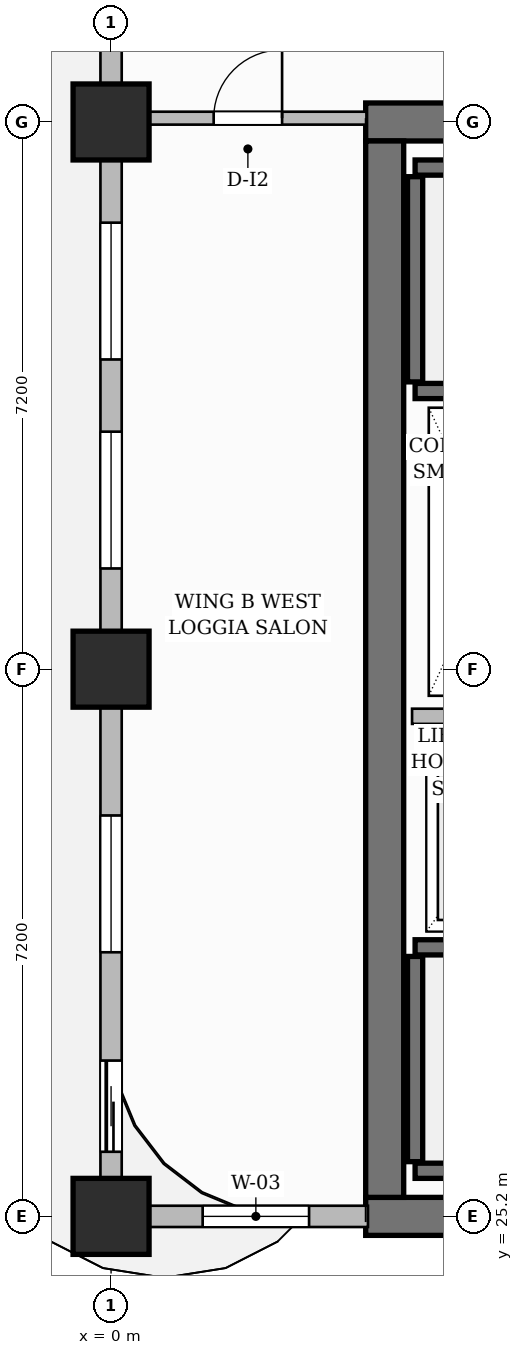
"""IFC4 building model, lengths in metres.
Left out: names, types, materials, properties, quantities, classifications, styles, units other than length and angle.
Written with IfcOpenShell. Run it as: python <this file> out.ifc"""

import sys

from ifc_helpers import new_model, si_unit, direction, frame, frame_2d, origin, origin_2d, place, context, subcontext, project, spatial, rectangle, extrude, source, transform, mapped, element, fill, save


model = new_model("IFC4")
c1 = context("Model", 3, precision=1e-05, world=origin(), true_north=direction((0.0, 1.0)))
c2 = subcontext(c1, "Body", "Model", "MODEL_VIEW")
j1 = project(units=[si_unit("LENGTHUNIT", "METRE"), si_unit("PLANEANGLEUNIT", "RADIAN")], contexts=[c1])
p1 = place(None, origin())
s1 = spatial("IfcSite", under=j1, at=p1, CompositionType="ELEMENT")
p2 = place(p1, origin())
s2 = spatial("IfcBuilding", under=s1, at=p2, CompositionType="ELEMENT")
p3 = place(p2, frame((0.0, 0.0, 165.7)))
s3 = spatial("IfcBuildingStorey", under=s2, at=p3, CompositionType="ELEMENT", Elevation=165.7)
for number, where, z_axis, x_axis in (
    (1, (3.35, 25.2, 0.0), (0.0, 0.0, 1.0), (1.0, 0.0, 0.0)),
    (2, (3.35, 39.6, 0.0), (0.0, 0.0, 1.0), (1.0, 0.0, 0.0)),
):
    element("IfcWall", number, at=place(p3, frame(where, z_axis=z_axis, x_axis=x_axis)), inside=s3, PredefinedType="SHEAR", context=c2, shape_type="SweptSolid", body=[
        extrude(rectangle(XDim=8.3, YDim=0.5, at=frame_2d((4.15, 0.0))), origin(), (0.0, 0.0, 1.0), 3.85),
    ])
p4 = place(p3, frame((3.6, 25.45, 0.0), z_axis=(0.0, 0.0, 1.0), x_axis=(0.0, 1.0, 0.0)))
e3 = element("IfcWall", 3, at=p4, inside=s3, PredefinedType="SHEAR", context=c2, shape_type="SweptSolid", body=[
    extrude(rectangle(XDim=13.9, YDim=0.5, at=frame_2d((6.95, 0.0))), origin(), (0.0, 0.0, 1.0), 3.85),
])
m1 = source(origin(), c2, "Body", "SweptSolid", [
    extrude(rectangle(XDim=1.0, YDim=1.0, at=origin_2d()), origin(), (0.0, 0.0, 1.0), 3.85),
])
for number, where, z_axis, x_axis in (
    (4, (0.0, 25.2, 0.0), (0.0, 0.0, 1.0), (1.0, 0.0, 0.0)),
    (5, (0.0, 32.4, 0.0), (0.0, 0.0, 1.0), (1.0, 0.0, 0.0)),
    (6, (0.0, 39.6, 0.0), (0.0, 0.0, 1.0), (1.0, 0.0, 0.0)),
):
    element("IfcColumn", number, at=place(p3, frame(where, z_axis=z_axis, x_axis=x_axis)), inside=s3, PredefinedType="COLUMN", context=c2, shape_type="MappedRepresentation", body=[
        mapped(m1, transform((0.0, 0.0, 0.0), scale=1.0)),
    ])
p5 = place(p3, frame((4.0, 25.8, 0.0), z_axis=(0.0, 0.0, 1.0), x_axis=(1.0, 0.0, 0.0)))
e7 = element("IfcWall", 7, at=p5, inside=s3, PredefinedType="SHEAR", context=c2, shape_type="SweptSolid", body=[
    extrude(rectangle(XDim=7.1, YDim=0.2, at=frame_2d((3.55, 0.0))), origin(), (0.0, 0.0, 1.0), 3.85),
])
p6 = place(p3, frame((4.0, 25.92, 0.0), z_axis=(0.0, 0.0, 1.0), x_axis=(0.0, 1.0, 0.0)))
e8 = element("IfcWall", 8, at=p6, inside=s3, PredefinedType="SHEAR", context=c2, shape_type="SweptSolid", body=[
    extrude(rectangle(XDim=2.7, YDim=0.2, at=frame_2d((1.35, 0.0))), origin(), (0.0, 0.0, 1.0), 3.85),
])
p7 = place(p3, frame((4.0, 28.74, 0.0), z_axis=(0.0, 0.0, 1.0), x_axis=(1.0, 0.0, 0.0)))
e9 = element("IfcWall", 9, at=p7, inside=s3, PredefinedType="SHEAR", context=c2, shape_type="SweptSolid", body=[
    extrude(rectangle(XDim=7.1, YDim=0.2, at=frame_2d((3.55, 0.0))), origin(), (0.0, 0.0, 1.0), 3.85),
])
p8 = place(p7, frame((5.815, 0.0, 0.0)))
e10 = element("IfcOpeningElement", 10, at=p8, cuts=e9, PredefinedType="OPENING", context=c2, shape_type="SweptSolid", body=[
    extrude(rectangle(XDim=1.05, YDim=2.2, at=frame_2d((0.525, 1.1))), frame((0.0, 0.11, 0.0), z_axis=(0.0, -1.0, 0.0), x_axis=(1.0, 0.0, 0.0)), (0.0, 0.0, 1.0), 0.22),
])
p9 = place(p3, frame((4.0, 39.0, 0.0), z_axis=(0.0, 0.0, 1.0), x_axis=(1.0, 0.0, 0.0)))
e11 = element("IfcWall", 11, at=p9, inside=s3, PredefinedType="SHEAR", context=c2, shape_type="SweptSolid", body=[
    extrude(rectangle(XDim=7.1, YDim=0.2, at=frame_2d((3.55, 0.0))), origin(), (0.0, 0.0, 1.0), 3.85),
])
p10 = place(p3, frame((4.0, 36.18, 0.0), z_axis=(0.0, 0.0, 1.0), x_axis=(0.0, 1.0, 0.0)))
e12 = element("IfcWall", 12, at=p10, inside=s3, PredefinedType="SHEAR", context=c2, shape_type="SweptSolid", body=[
    extrude(rectangle(XDim=2.7, YDim=0.2, at=frame_2d((1.35, 0.0))), origin(), (0.0, 0.0, 1.0), 3.85),
])
p11 = place(p3, frame((4.0, 36.06, 0.0), z_axis=(0.0, 0.0, 1.0), x_axis=(1.0, 0.0, 0.0)))
e13 = element("IfcWall", 13, at=p11, inside=s3, PredefinedType="SHEAR", context=c2, shape_type="SweptSolid", body=[
    extrude(rectangle(XDim=7.1, YDim=0.2, at=frame_2d((3.55, 0.0))), origin(), (0.0, 0.0, 1.0), 3.85),
])
p12 = place(p11, frame((5.815, 0.0, 0.0)))
e14 = element("IfcOpeningElement", 14, at=p12, cuts=e13, PredefinedType="OPENING", context=c2, shape_type="SweptSolid", body=[
    extrude(rectangle(XDim=1.05, YDim=2.2, at=frame_2d((0.525, 1.1))), frame((0.0, 0.11, 0.0), z_axis=(0.0, -1.0, 0.0), x_axis=(1.0, 0.0, 0.0)), (0.0, 0.0, 1.0), 0.22),
])
p13 = place(p3, frame((3.96, 31.78, 0.0), z_axis=(0.0, 0.0, 1.0), x_axis=(1.0, 0.0, 0.0)))
e15 = element("IfcWall", 15, at=p13, inside=s3, PredefinedType="PARTITIONING", context=c2, shape_type="SweptSolid", body=[
    extrude(rectangle(XDim=2.13, YDim=0.2, at=frame_2d((1.065, 0.0))), origin(), (0.0, 0.0, 1.0), 3.6),
])
p14 = place(p3, frame((0.24, 39.65, 0.0), z_axis=(0.0, 0.0, 1.0), x_axis=(1.0, 0.0, 0.0)))
e16 = element("IfcWall", 16, at=p14, inside=s3, PredefinedType="PARTITIONING", context=c2, shape_type="SweptSolid", body=[
    extrude(rectangle(XDim=3.12, YDim=0.17, at=frame_2d((1.56, 0.0))), origin(), (0.0, 0.0, 1.0), 3.6),
])
p15 = place(p14, frame((1.11, 0.0, 0.0)))
e17 = element("IfcOpeningElement", 17, at=p15, cuts=e16, PredefinedType="OPENING", context=c2, shape_type="SweptSolid", body=[
    extrude(rectangle(XDim=0.9, YDim=2.15, at=frame_2d((0.45, 1.075))), frame((0.0, 0.095, 0.0), z_axis=(0.0, -1.0, 0.0), x_axis=(1.0, 0.0, 0.0)), (0.0, 0.0, 1.0), 0.19),
])
p16 = place(p3, frame((0.0, 25.2, 0.0), z_axis=(0.0, 0.0, 1.0), x_axis=(1.0, 0.0, 0.0)))
e18 = element("IfcWall", 18, at=p16, inside=s3, PredefinedType="SOLIDWALL", context=c2, shape_type="SweptSolid", body=[
    extrude(rectangle(XDim=3.38, YDim=0.28, at=frame_2d((1.69, 0.0))), origin(), (0.0, 0.0, 1.0), 3.6),
])
p17 = place(p16, frame((1.205, 0.0, 0.8)))
e19 = element("IfcOpeningElement", 19, at=p17, cuts=e18, PredefinedType="OPENING", context=c2, shape_type="SweptSolid", body=[
    extrude(rectangle(XDim=1.4, YDim=1.85, at=frame_2d((0.7, 0.925))), frame((0.0, 0.15, 0.0), z_axis=(0.0, -1.0, 0.0), x_axis=(1.0, 0.0, 0.0)), (0.0, 0.0, 1.0), 0.3),
])
p18 = place(p3, frame((0.0, 25.25, 0.0), z_axis=(0.0, 0.0, 1.0), x_axis=(0.0, 1.0, 0.0)))
e20 = element("IfcWall", 20, at=p18, inside=s3, PredefinedType="SOLIDWALL", context=c2, shape_type="SweptSolid", body=[
    extrude(rectangle(XDim=21.5, YDim=0.28, at=frame_2d((10.75, 0.0))), origin(), (0.0, 0.0, 1.0), 3.085),
])
p19 = place(p18, frame((18.357, 0.0, 0.0)))
e21 = element("IfcOpeningElement", 21, at=p19, cuts=e20, PredefinedType="OPENING", context=c2, shape_type="SweptSolid", body=[
    extrude(rectangle(XDim=1.2, YDim=2.2, at=frame_2d((0.6, 1.1))), frame((0.0, 0.15, 0.0), z_axis=(0.0, -1.0, 0.0), x_axis=(1.0, 0.0, 0.0)), (0.0, 0.0, 1.0), 0.3),
])
p20 = place(p18, frame((0.8, 0.0, 0.0)))
e22 = element("IfcOpeningElement", 22, at=p20, cuts=e20, PredefinedType="OPENING", context=c2, shape_type="SweptSolid", body=[
    extrude(rectangle(XDim=1.2, YDim=2.2, at=frame_2d((0.6, 1.1))), frame((0.0, 0.15, 0.0), z_axis=(0.0, -1.0, 0.0), x_axis=(1.0, 0.0, 0.0)), (0.0, 0.0, 1.0), 0.3),
])
p21 = place(p18, frame((3.425, 0.0, 0.8)))
e23 = element("IfcOpeningElement", 23, at=p21, cuts=e20, PredefinedType="OPENING", context=c2, shape_type="SweptSolid", body=[
    extrude(rectangle(XDim=1.8, YDim=1.85, at=frame_2d((0.9, 0.925))), frame((0.0, 0.15, 0.0), z_axis=(0.0, -1.0, 0.0), x_axis=(1.0, 0.0, 0.0)), (0.0, 0.0, 1.0), 0.3),
])
p22 = place(p18, frame((8.475, 0.0, 0.8)))
e24 = element("IfcOpeningElement", 24, at=p22, cuts=e20, PredefinedType="OPENING", context=c2, shape_type="SweptSolid", body=[
    extrude(rectangle(XDim=1.8, YDim=1.85, at=frame_2d((0.9, 0.925))), frame((0.0, 0.15, 0.0), z_axis=(0.0, -1.0, 0.0), x_axis=(1.0, 0.0, 0.0)), (0.0, 0.0, 1.0), 0.3),
])
p23 = place(p18, frame((11.225, 0.0, 0.8)))
e25 = element("IfcOpeningElement", 25, at=p23, cuts=e20, PredefinedType="OPENING", context=c2, shape_type="SweptSolid", body=[
    extrude(rectangle(XDim=1.8, YDim=1.85, at=frame_2d((0.9, 0.925))), frame((0.0, 0.15, 0.0), z_axis=(0.0, -1.0, 0.0), x_axis=(1.0, 0.0, 0.0)), (0.0, 0.0, 1.0), 0.3),
])
p24 = place(p18, frame((16.632, 0.0, 0.8)))
e26 = element("IfcOpeningElement", 26, at=p24, cuts=e20, PredefinedType="OPENING", context=c2, shape_type="SweptSolid", body=[
    extrude(rectangle(XDim=1.15, YDim=1.8, at=frame_2d((0.575, 0.9))), frame((0.0, 0.15, 0.0), z_axis=(0.0, -1.0, 0.0), x_axis=(1.0, 0.0, 0.0)), (0.0, 0.0, 1.0), 0.3),
])
m2 = source(origin(), c2, "Body", "SweptSolid", [
    extrude(rectangle(XDim=0.9, YDim=2.15, at=frame_2d((0.45, 1.075))), frame((0.0, 0.025, 0.0), z_axis=(0.0, -1.0, 0.0), x_axis=(1.0, 0.0, 0.0)), (0.0, 0.0, 1.0), 0.05),
])
p25 = place(p15, origin())
e27 = element("IfcDoor", 27, at=p25, inside=s3, OperationType="SINGLE_SWING_RIGHT", PredefinedType="DOOR", context=c2, shape_type="MappedRepresentation", body=[
    mapped(m2, transform((0.0, 0.0, 0.0), scale=1.0)),
])
fill(e17, e27)
m3 = source(origin(), c2, "Body", "SweptSolid", [
    extrude(rectangle(XDim=1.2, YDim=2.2, at=frame_2d((0.6, 1.1))), frame((0.0, 0.025, 0.0), z_axis=(0.0, -1.0, 0.0), x_axis=(1.0, 0.0, 0.0)), (0.0, 0.0, 1.0), 0.05),
])
p26 = place(p20, origin())
e28 = element("IfcDoor", 28, at=p26, inside=s3, OperationType="SLIDING_TO_LEFT", PredefinedType="DOOR", context=c2, shape_type="MappedRepresentation", body=[
    mapped(m3, transform((0.0, 0.0, 0.0), scale=1.0)),
])
fill(e22, e28)
m4 = source(origin(), c2, "Body", "SweptSolid", [
    extrude(rectangle(XDim=1.4, YDim=1.85, at=frame_2d((0.7, 0.925))), frame((0.0, 0.03, 0.0), z_axis=(0.0, -1.0, 0.0), x_axis=(1.0, 0.0, 0.0)), (0.0, 0.0, 1.0), 0.06),
])
p27 = place(p17, origin())
e29 = element("IfcWindow", 29, at=p27, inside=s3, PartitioningType="SINGLE_PANEL", PredefinedType="WINDOW", context=c2, shape_type="MappedRepresentation", body=[
    mapped(m4, transform((0.0, 0.0, 0.0), scale=1.0)),
])
fill(e19, e29)
m5 = source(origin(), c2, "Body", "SweptSolid", [
    extrude(rectangle(XDim=1.8, YDim=1.85, at=frame_2d((0.9, 0.925))), frame((0.0, 0.03, 0.0), z_axis=(0.0, -1.0, 0.0), x_axis=(1.0, 0.0, 0.0)), (0.0, 0.0, 1.0), 0.06),
])
p28 = place(p21, origin())
e30 = element("IfcWindow", 30, at=p28, inside=s3, PartitioningType="DOUBLE_PANEL_VERTICAL", PredefinedType="WINDOW", context=c2, shape_type="MappedRepresentation", body=[
    mapped(m5, transform((0.0, 0.0, 0.0), scale=1.0)),
])
fill(e23, e30)
p29 = place(p22, origin())
e31 = element("IfcWindow", 31, at=p29, inside=s3, PartitioningType="DOUBLE_PANEL_VERTICAL", PredefinedType="WINDOW", context=c2, shape_type="MappedRepresentation", body=[
    mapped(m5, transform((0.0, 0.0, 0.0), scale=1.0)),
])
fill(e24, e31)
p30 = place(p23, origin())
e32 = element("IfcWindow", 32, at=p30, inside=s3, PartitioningType="DOUBLE_PANEL_VERTICAL", PredefinedType="WINDOW", context=c2, shape_type="MappedRepresentation", body=[
    mapped(m5, transform((0.0, 0.0, 0.0), scale=1.0)),
])
fill(e25, e32)
save(model, sys.argv[1])
